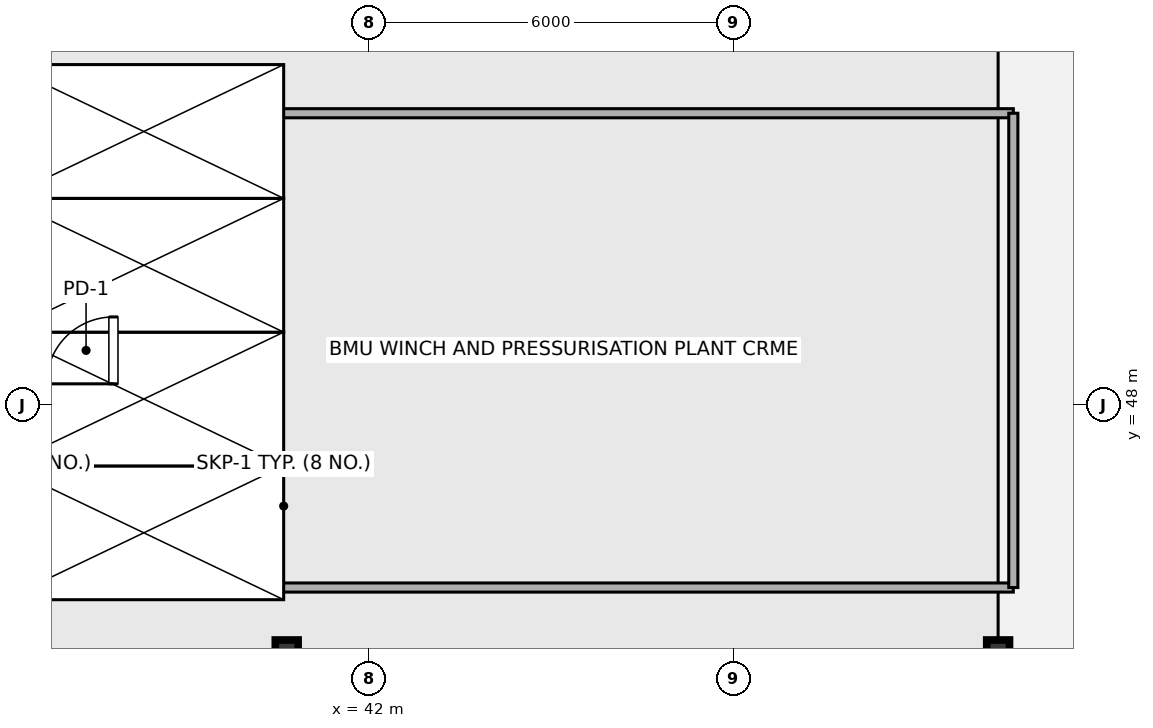
"""IFC4 building model, lengths in metres.
Left out: names, types, materials, properties, quantities, classifications, styles, units other than length and angle.
Written with IfcOpenShell. Run it as: python <this file> out.ifc"""

import sys

from ifc_helpers import new_model, si_unit, direction, frame, frame_2d, origin, origin_2d, place, context, subcontext, project, spatial, rectangle, hollow_rectangle, extrude, source, transform, mapped, element, fill, save


model = new_model("IFC4")
c1 = context("Model", 3, precision=1e-05, world=origin(), true_north=direction((0.0, 1.0)))
c2 = subcontext(c1, "Body", "Model", "MODEL_VIEW")
j1 = project(units=[si_unit("LENGTHUNIT", "METRE"), si_unit("PLANEANGLEUNIT", "RADIAN")], contexts=[c1])
p1 = place(None, origin())
s1 = spatial("IfcSite", under=j1, at=p1, CompositionType="ELEMENT")
p2 = place(p1, origin())
s2 = spatial("IfcBuilding", under=s1, at=p2, CompositionType="ELEMENT")
p3 = place(p2, frame((0.0, 0.0, 315.72)))
s3 = spatial("IfcBuildingStorey", under=s2, at=p3, CompositionType="ELEMENT", Elevation=315.72)
m1 = source(origin(), c2, "Body", "SweptSolid", [
    extrude(hollow_rectangle(XDim=0.4, YDim=0.4, WallThickness=0.02, OuterFilletRadius=0.04, at=origin_2d()), origin(), (0.0, 0.0, 1.0), 3.96),
])
for number, where, z_axis, x_axis in (
    (1, (52.35, 43.95, 0.0), (0.0, 0.0, 1.0), (1.0, 0.0, 0.0)),
    (2, (40.65, 43.95, 0.0), (0.0, 0.0, 1.0), (1.0, 0.0, 0.0)),
):
    element("IfcColumn", number, at=place(p3, frame(where, z_axis=z_axis, x_axis=x_axis)), inside=s3, PredefinedType="COLUMN", context=c2, shape_type="MappedRepresentation", body=[
        mapped(m1, transform((0.0, 0.0, 0.0), x_axis=(1.0, 0.0, 0.0), y_axis=(0.0, 1.0, 0.0), z_axis=(0.0, 0.0, 1.0), scale=1.0)),
    ])
m2 = source(origin(), c2, "Body", "SweptSolid", [
    extrude(hollow_rectangle(XDim=0.35, YDim=0.35, WallThickness=0.016, OuterFilletRadius=0.032, at=origin_2d()), origin(), (0.0, 0.0, 1.0), 0.354),
])
p4 = place(p3, frame((52.35, 43.95, 3.96), z_axis=(0.0, 0.0, 1.0), x_axis=(1.0, 0.0, 0.0)))
e3 = element("IfcColumn", 3, at=p4, inside=s3, PredefinedType="COLUMN", context=c2, shape_type="MappedRepresentation", body=[
    mapped(m2, transform((0.0, 0.0, 0.0), x_axis=(1.0, 0.0, 0.0), y_axis=(0.0, 1.0, 0.0), z_axis=(0.0, 0.0, 1.0), scale=1.0)),
])
m3 = source(origin(), c2, "Body", "SweptSolid", [
    extrude(hollow_rectangle(XDim=0.35, YDim=0.35, WallThickness=0.016, OuterFilletRadius=0.032, at=origin_2d()), origin(), (0.0, 0.0, 1.0), 1.345),
])
p5 = place(p3, frame((40.65, 43.95, 3.96), z_axis=(0.0, 0.0, 1.0), x_axis=(1.0, 0.0, 0.0)))
e4 = element("IfcColumn", 4, at=p5, inside=s3, PredefinedType="COLUMN", context=c2, shape_type="MappedRepresentation", body=[
    mapped(m3, transform((0.0, 0.0, 0.0), x_axis=(1.0, 0.0, 0.0), y_axis=(0.0, 1.0, 0.0), z_axis=(0.0, 0.0, 1.0), scale=1.0)),
])
for number, where, z_axis, x_axis in (
    (5, (37.8, 45.0, 0.0), (0.0, 0.0, 1.0), (1.0, 0.0, 0.0)),
    (6, (37.8, 52.8, 0.0), (0.0, 0.0, 1.0), (1.0, 0.0, 0.0)),
):
    element("IfcWall", number, at=place(p3, frame(where, z_axis=z_axis, x_axis=x_axis)), inside=s3, PredefinedType="PARTITIONING", context=c2, shape_type="SweptSolid", body=[
        extrude(rectangle(XDim=14.8, YDim=0.15, at=frame_2d((7.4, 0.0))), origin(), (0.0, 0.0, 1.0), 3.092),
    ])
p6 = place(p3, frame((37.8, 45.0, 0.0), z_axis=(0.0, 0.0, 1.0), x_axis=(0.0, 1.0, 0.0)))
e7 = element("IfcWall", 7, at=p6, inside=s3, PredefinedType="PARTITIONING", context=c2, shape_type="SweptSolid", body=[
    extrude(rectangle(XDim=7.8, YDim=0.15, at=frame_2d((3.9, 0.0))), origin(), (0.0, 0.0, 1.0), 3.61),
])
p7 = place(p6, frame((3.35, 0.0, 0.0)))
e8 = element("IfcOpeningElement", 8, at=p7, cuts=e7, PredefinedType="OPENING", context=c2, shape_type="SweptSolid", body=[
    extrude(rectangle(XDim=1.1, YDim=2.1, at=origin_2d()), frame((0.55, 0.085, 1.05), z_axis=(0.0, -1.0, 0.0), x_axis=(1.0, 0.0, 0.0)), (0.0, 0.0, 1.0), 0.17),
])
p8 = place(p3, frame((52.6, 45.0, 0.0), z_axis=(0.0, 0.0, 1.0), x_axis=(0.0, 1.0, 0.0)))
e9 = element("IfcWall", 9, at=p8, inside=s3, PredefinedType="PARTITIONING", context=c2, shape_type="SweptSolid", body=[
    extrude(rectangle(XDim=7.8, YDim=0.15, at=frame_2d((3.9, 0.0))), origin(), (0.0, 0.0, 1.0), 2.925),
])
m4 = source(origin(), c2, "Body", "SweptSolid", [
    extrude(rectangle(XDim=1.1, YDim=2.1, at=origin_2d()), frame((0.55, 0.025, 1.05), z_axis=(0.0, -1.0, 0.0), x_axis=(1.0, 0.0, 0.0)), (0.0, 0.0, 1.0), 0.05),
])
p9 = place(p7, origin())
e10 = element("IfcDoor", 10, at=p9, inside=s3, OperationType="SINGLE_SWING_LEFT", PredefinedType="DOOR", context=c2, shape_type="MappedRepresentation", body=[
    mapped(m4, transform((0.0, 0.0, 0.0), x_axis=(1.0, 0.0, 0.0), y_axis=(0.0, 1.0, 0.0), z_axis=(0.0, 0.0, 1.0), scale=1.0)),
])
fill(e8, e10)
save(model, sys.argv[1])
